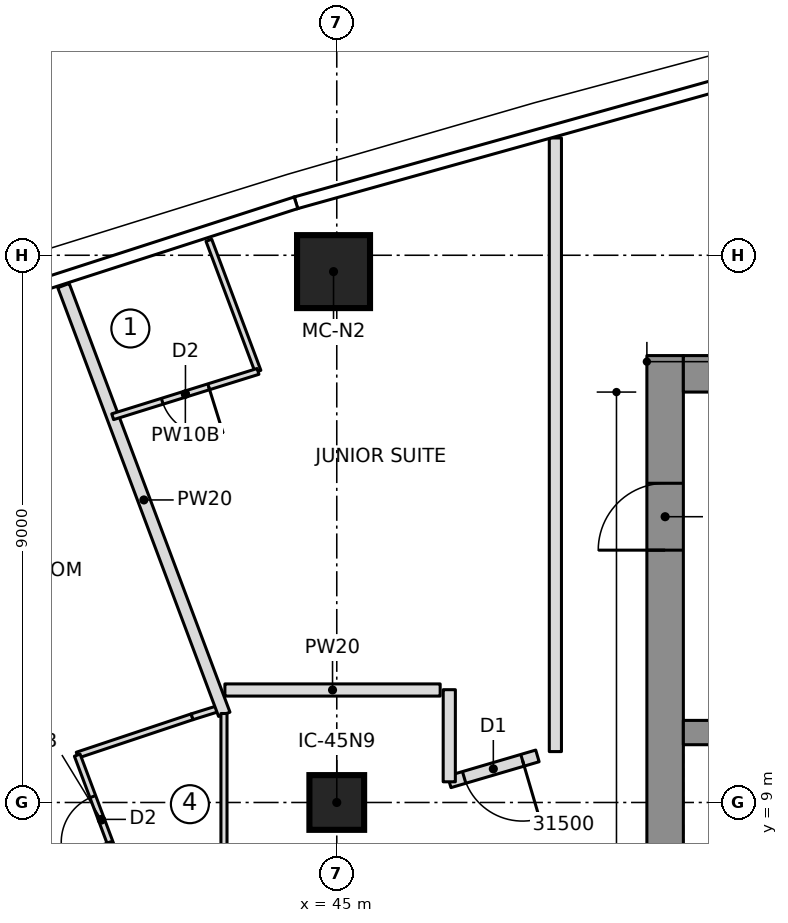
"""IFC4 building model, lengths in metres.
Left out: names, types, materials, properties, quantities, classifications, styles, units other than length and angle.
Written with IfcOpenShell. Run it as: python <this file> out.ifc"""

import sys

from ifc_helpers import new_model, si_unit, direction, frame, frame_2d, origin, origin_2d, place, context, subcontext, project, spatial, rectangle, extrude, element, fill, save


model = new_model("IFC4")
c1 = context("Model", 3, precision=1e-05, world=origin(), true_north=direction((0.0, 1.0)))
c2 = subcontext(c1, "Body", "Model", "MODEL_VIEW")
j1 = project(units=[si_unit("LENGTHUNIT", "METRE"), si_unit("PLANEANGLEUNIT", "RADIAN")], contexts=[c1])
p1 = place(None, origin())
s1 = spatial("IfcSite", under=j1, at=p1, CompositionType="ELEMENT")
p2 = place(p1, origin())
s2 = spatial("IfcBuilding", under=s1, at=p2, CompositionType="ELEMENT")
p3 = place(p2, frame((0.0, 0.0, 252.75)))
s3 = spatial("IfcBuildingStorey", under=s2, at=p3, CompositionType="ELEMENT", Elevation=252.75)
p4 = place(p3, frame((50.4, 6.65, 0.0), z_axis=(0.0, 0.0, 1.0), x_axis=(0.0, 1.0, 0.0)))
e1 = element("IfcWall", 1, at=p4, inside=s3, PredefinedType="SHEAR", context=c2, shape_type="SweptSolid", body=[
    extrude(rectangle(XDim=9.7, YDim=0.6, at=frame_2d((4.85, 0.0))), origin(), (0.0, 0.0, 1.0), 3.55),
])
p5 = place(p4, frame((6.5, 0.0, 0.0)))
e2 = element("IfcOpeningElement", 2, at=p5, cuts=e1, PredefinedType="OPENING", context=c2, shape_type="SweptSolid", body=[
    extrude(rectangle(XDim=1.1, YDim=2.1, at=frame_2d((0.55, 1.05))), frame((0.0, 0.31, 0.0), z_axis=(0.0, -1.0, 0.0), x_axis=(1.0, 0.0, 0.0)), (0.0, 0.0, 1.0), 0.62),
])
p6 = place(p3, frame((50.7, 16.05, 0.0), z_axis=(0.0, 0.0, 1.0), x_axis=(1.0, 0.0, 0.0)))
e3 = element("IfcWall", 3, at=p6, inside=s3, PredefinedType="SHEAR", context=c2, shape_type="SweptSolid", body=[
    extrude(rectangle(XDim=13.62, YDim=0.6, at=frame_2d((6.81, 0.0))), origin(), (0.0, 0.0, 1.0), 3.55),
])
p7 = place(p3, frame((50.7, 10.15, 0.0), z_axis=(0.0, 0.0, 1.0), x_axis=(1.0, 0.0, 0.0)))
e4 = element("IfcWall", 4, at=p7, inside=s3, PredefinedType="SHEAR", context=c2, shape_type="SweptSolid", body=[
    extrude(rectangle(XDim=13.02, YDim=0.4, at=frame_2d((6.51, 0.0))), origin(), (0.0, 0.0, 1.0), 3.55),
])
p8 = place(p7, frame((0.7, 0.0, 0.0)))
e5 = element("IfcOpeningElement", 5, at=p8, cuts=e4, PredefinedType="OPENING", context=c2, shape_type="SweptSolid", body=[
    extrude(rectangle(XDim=1.1, YDim=2.1, at=frame_2d((0.55, 1.05))), frame((0.0, 0.21, 0.0), z_axis=(0.0, -1.0, 0.0), x_axis=(1.0, 0.0, 0.0)), (0.0, 0.0, 1.0), 0.42),
])
p9 = place(p7, frame((3.5, 0.0, 0.0)))
e6 = element("IfcOpeningElement", 6, at=p9, cuts=e4, PredefinedType="OPENING", context=c2, shape_type="SweptSolid", body=[
    extrude(rectangle(XDim=1.1, YDim=2.1, at=frame_2d((0.55, 1.05))), frame((0.0, 0.21, 0.0), z_axis=(0.0, -1.0, 0.0), x_axis=(1.0, 0.0, 0.0)), (0.0, 0.0, 1.0), 0.42),
])
p10 = place(p3, frame((44.947, 17.731, 0.0), z_axis=(0.0, 0.0, 1.0), x_axis=(1.0, 0.0, 0.0)))
e7 = element("IfcColumn", 7, at=p10, inside=s3, PredefinedType="COLUMN", context=c2, shape_type="SweptSolid", body=[
    extrude(rectangle(XDim=1.2, YDim=1.2, at=origin_2d()), origin(), (0.0, 0.0, 1.0), 3.55),
])
p11 = place(p3, frame((45.0, 9.0, 0.0), z_axis=(0.0, 0.0, 1.0), x_axis=(1.0, 0.0, 0.0)))
e8 = element("IfcColumn", 8, at=p11, inside=s3, PredefinedType="COLUMN", context=c2, shape_type="SweptSolid", body=[
    extrude(rectangle(XDim=0.9, YDim=0.9, at=origin_2d()), origin(), (0.0, 0.0, 1.0), 3.55),
])
p12 = place(p3, frame((40.732, 9.779, 0.0), z_axis=(0.0, 0.0, 1.0), x_axis=(0.948499248693, 0.316779379426, 0.0)))
e9 = element("IfcWall", 9, at=p12, inside=s3, PredefinedType="PARTITIONING", context=c2, shape_type="SweptSolid", body=[
    extrude(rectangle(XDim=1.991, YDim=0.1, at=frame_2d((0.996, 0.0))), origin(), (0.0, 0.0, 1.0), 3.15),
])
p13 = place(p3, frame((42.621, 10.409, 0.0), z_axis=(0.0, 0.0, 1.0), x_axis=(0.954624465478, 0.297812239356, 0.0)))
e10 = element("IfcWall", 10, at=p13, inside=s3, PredefinedType="PARTITIONING", context=c2, shape_type="SweptSolid", body=[
    extrude(rectangle(XDim=0.511, YDim=0.1, at=frame_2d((0.255, 0.0))), origin(), (0.0, 0.0, 1.0), 3.15),
])
p14 = place(p3, frame((41.532, 7.645, 0.0), z_axis=(0.0, 0.0, 1.0), x_axis=(-0.351146927505, 0.936320370014, 0.0)))
e11 = element("IfcWall", 11, at=p14, inside=s3, PredefinedType="PARTITIONING", context=c2, shape_type="SweptSolid", body=[
    extrude(rectangle(XDim=2.278, YDim=0.1, at=frame_2d((1.139, 0.0))), origin(), (0.0, 0.0, 1.0), 3.15),
])
p15 = place(p14, frame((0.75, 0.0, 0.0)))
e12 = element("IfcOpeningElement", 12, at=p15, cuts=e11, PredefinedType="OPENING", context=c2, shape_type="SweptSolid", body=[
    extrude(rectangle(XDim=0.8, YDim=2.1, at=frame_2d((0.4, 1.05))), frame((0.0, 0.06, 0.0), z_axis=(0.0, -1.0, 0.0), x_axis=(1.0, 0.0, 0.0)), (0.0, 0.0, 1.0), 0.12),
])
p16 = place(p3, frame((43.15, 10.45, 0.0), z_axis=(0.0, 0.0, 1.0), x_axis=(-0.351119888923, 0.936330509811, 0.0)))
e13 = element("IfcWall", 13, at=p16, inside=s3, PredefinedType="PARTITIONING", context=c2, shape_type="SweptSolid", body=[
    extrude(rectangle(XDim=7.531, YDim=0.2, at=frame_2d((3.766, 0.0))), origin(), (0.0, 0.0, 1.0), 3.15),
])
p17 = place(p3, frame((42.896, 18.247, 0.0), z_axis=(0.0, 0.0, 1.0), x_axis=(0.351111827312, -0.936333532841, 0.0)))
e14 = element("IfcWall", 14, at=p17, inside=s3, PredefinedType="PARTITIONING", context=c2, shape_type="SweptSolid", body=[
    extrude(rectangle(XDim=2.304, YDim=0.1, at=frame_2d((1.152, 0.0))), origin(), (0.0, 0.0, 1.0), 3.15),
])
p18 = place(p3, frame((43.705, 16.09, 0.0), z_axis=(0.0, 0.0, 1.0), x_axis=(-0.954665433195, -0.297680887299, 0.0)))
e15 = element("IfcWall", 15, at=p18, inside=s3, PredefinedType="PARTITIONING", context=c2, shape_type="SweptSolid", body=[
    extrude(rectangle(XDim=2.504, YDim=0.1, at=frame_2d((1.252, 0.0))), origin(), (0.0, 0.0, 1.0), 3.15),
])
p19 = place(p18, frame((0.85, 0.0, 0.0)))
e16 = element("IfcOpeningElement", 16, at=p19, cuts=e15, PredefinedType="OPENING", context=c2, shape_type="SweptSolid", body=[
    extrude(rectangle(XDim=0.8, YDim=2.1, at=frame_2d((0.4, 1.05))), frame((0.0, 0.06, 0.0), z_axis=(0.0, -1.0, 0.0), x_axis=(1.0, 0.0, 0.0)), (0.0, 0.0, 1.0), 0.12),
])
p20 = place(p3, frame((43.145, 10.463, 0.0), z_axis=(0.0, 0.0, 1.0), x_axis=(0.0, -1.0, 0.0)))
e17 = element("IfcWall", 17, at=p20, inside=s3, PredefinedType="PARTITIONING", context=c2, shape_type="SweptSolid", body=[
    extrude(rectangle(XDim=2.298, YDim=0.1, at=frame_2d((1.149, 0.0))), origin(), (0.0, 0.0, 1.0), 3.15),
])
p21 = place(p3, frame((48.3, 9.766, 0.0), z_axis=(0.0, 0.0, 1.0), x_axis=(-0.95944263903, -0.281903924079, 0.0)))
e18 = element("IfcWall", 18, at=p21, inside=s3, PredefinedType="PARTITIONING", context=c2, shape_type="SweptSolid", body=[
    extrude(rectangle(XDim=1.511, YDim=0.2, at=frame_2d((0.756, 0.0))), origin(), (0.0, 0.0, 1.0), 3.15),
])
p22 = place(p21, frame((0.256, 0.0, 0.0)))
e19 = element("IfcOpeningElement", 19, at=p22, cuts=e18, PredefinedType="OPENING", context=c2, shape_type="SweptSolid", body=[
    extrude(rectangle(XDim=1.0, YDim=2.1, at=frame_2d((0.5, 1.05))), frame((0.0, 0.11, 0.0), z_axis=(0.0, -1.0, 0.0), x_axis=(1.0, 0.0, 0.0)), (0.0, 0.0, 1.0), 0.22),
])
p23 = place(p3, frame((48.595, 19.929, 0.0), z_axis=(0.0, 0.0, 1.0), x_axis=(0.0, -1.0, 0.0)))
e20 = element("IfcWall", 20, at=p23, inside=s3, PredefinedType="PARTITIONING", context=c2, shape_type="SweptSolid", body=[
    extrude(rectangle(XDim=10.093, YDim=0.2, at=frame_2d((5.046, 0.0))), origin(), (0.0, 0.0, 1.0), 3.15),
])
p24 = place(p3, frame((46.85, 9.34, 0.0), z_axis=(0.0, 0.0, 1.0), x_axis=(0.000322320692, 0.999999948055, 0.0)))
e21 = element("IfcWall", 21, at=p24, inside=s3, PredefinedType="PARTITIONING", context=c2, shape_type="SweptSolid", body=[
    extrude(rectangle(XDim=1.515, YDim=0.2, at=frame_2d((0.757, 0.0))), origin(), (0.0, 0.0, 1.0), 3.15),
])
p25 = place(p3, frame((43.16, 10.85, 0.0), z_axis=(0.0, 0.0, 1.0), x_axis=(1.0, 0.0, 0.0)))
e22 = element("IfcWall", 22, at=p25, inside=s3, PredefinedType="PARTITIONING", context=c2, shape_type="SweptSolid", body=[
    extrude(rectangle(XDim=3.54, YDim=0.2, at=frame_2d((1.77, 0.0))), origin(), (0.0, 0.0, 1.0), 3.15),
])
p26 = place(p15, origin())
e23 = element("IfcDoor", 23, at=p26, inside=s3, OperationType="SINGLE_SWING_LEFT", PredefinedType="DOOR", context=c2, shape_type="SweptSolid", body=[
    extrude(rectangle(XDim=0.8, YDim=2.1, at=frame_2d((0.4, 1.05))), frame((0.0, 0.025, 0.0), z_axis=(0.0, -1.0, 0.0), x_axis=(1.0, 0.0, 0.0)), (0.0, 0.0, 1.0), 0.05),
])
fill(e12, e23)
p27 = place(p19, origin())
e24 = element("IfcDoor", 24, at=p27, inside=s3, OperationType="SINGLE_SWING_LEFT", PredefinedType="DOOR", context=c2, shape_type="SweptSolid", body=[
    extrude(rectangle(XDim=0.8, YDim=2.1, at=frame_2d((0.4, 1.05))), frame((0.0, 0.025, 0.0), z_axis=(0.0, -1.0, 0.0), x_axis=(1.0, 0.0, 0.0)), (0.0, 0.0, 1.0), 0.05),
])
fill(e16, e24)
p28 = place(p22, origin())
e25 = element("IfcDoor", 25, at=p28, inside=s3, OperationType="SINGLE_SWING_LEFT", PredefinedType="DOOR", context=c2, shape_type="SweptSolid", body=[
    extrude(rectangle(XDim=1.0, YDim=2.1, at=frame_2d((0.5, 1.05))), frame((0.0, 0.025, 0.0), z_axis=(0.0, -1.0, 0.0), x_axis=(1.0, 0.0, 0.0)), (0.0, 0.0, 1.0), 0.05),
])
fill(e19, e25)
p29 = place(p5, origin())
e26 = element("IfcDoor", 26, at=p29, inside=s3, OperationType="SINGLE_SWING_RIGHT", PredefinedType="DOOR", context=c2, shape_type="SweptSolid", body=[
    extrude(rectangle(XDim=1.1, YDim=2.1, at=frame_2d((0.55, 1.05))), frame((0.0, 0.025, 0.0), z_axis=(0.0, -1.0, 0.0), x_axis=(1.0, 0.0, 0.0)), (0.0, 0.0, 1.0), 0.05),
])
fill(e2, e26)
save(model, sys.argv[1])
